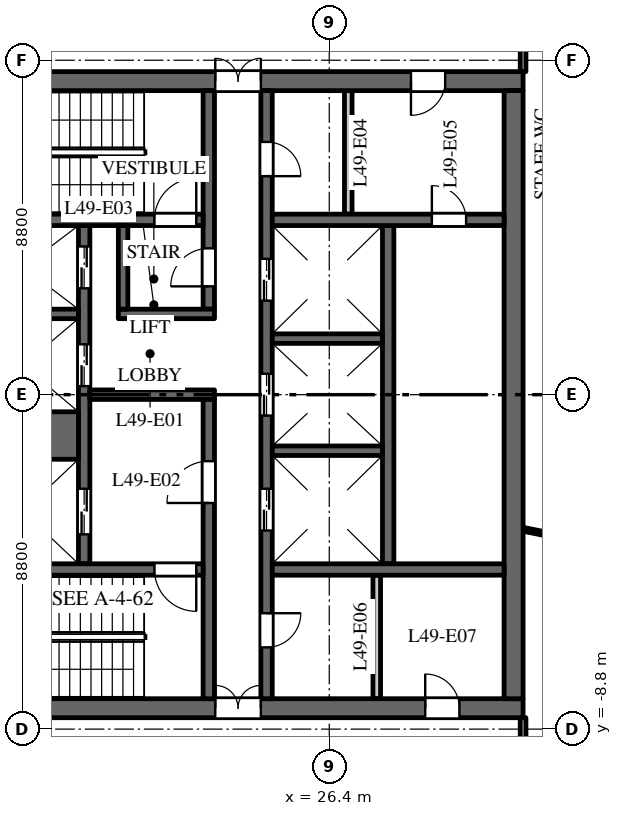
"""IFC4 building model, lengths in metres.
Left out: names, types, materials, properties, quantities, classifications, styles, units other than length and angle.
Written with IfcOpenShell. Run it as: python <this file> out.ifc"""

import sys

from ifc_helpers import new_model, si_unit, direction, frame, frame_2d, origin, place, context, subcontext, project, spatial, rectangle, extrude, element, fill, save


model = new_model("IFC4")
c1 = context("Model", 3, precision=1e-05, world=origin(), true_north=direction((0.0, 1.0)))
c2 = subcontext(c1, "Body", "Model", "MODEL_VIEW")
j1 = project(units=[si_unit("LENGTHUNIT", "METRE"), si_unit("PLANEANGLEUNIT", "RADIAN")], contexts=[c1])
p1 = place(None, origin())
s1 = spatial("IfcSite", under=j1, at=p1, CompositionType="ELEMENT")
p2 = place(p1, origin())
s2 = spatial("IfcBuilding", under=s1, at=p2, CompositionType="ELEMENT")
p3 = place(p2, frame((0.0, 0.0, 237.5)))
s3 = spatial("IfcBuildingStorey", under=s2, at=p3, CompositionType="ELEMENT", Elevation=237.5)
p4 = place(p3, frame((16.5, 8.25, 0.0), z_axis=(0.0, 0.0, 1.0), x_axis=(1.0, 0.0, 0.0)))
e1 = element("IfcWall", 1, at=p4, inside=s3, PredefinedType="SHEAR", context=c2, shape_type="SweptSolid", body=[
    extrude(rectangle(XDim=15.0, YDim=0.5, at=frame_2d((7.5, 0.0))), origin(), (0.0, 0.0, 1.0), 3.7),
])
p5 = place(p4, frame((6.9, 0.0, 0.0)))
e2 = element("IfcOpeningElement", 2, at=p5, cuts=e1, PredefinedType="OPENING", context=c2, shape_type="SweptSolid", body=[
    extrude(rectangle(XDim=1.2, YDim=2.1, at=frame_2d((0.6, 1.05))), frame((0.0, 0.26, 0.0), z_axis=(0.0, -1.0, 0.0), x_axis=(1.0, 0.0, 0.0)), (0.0, 0.0, 1.0), 0.52),
])
p6 = place(p4, frame((12.05, 0.0, 0.0)))
e3 = element("IfcOpeningElement", 3, at=p6, cuts=e1, PredefinedType="OPENING", context=c2, shape_type="SweptSolid", body=[
    extrude(rectangle(XDim=0.9, YDim=2.1, at=frame_2d((0.45, 1.05))), frame((0.0, 0.26, 0.0), z_axis=(0.0, -1.0, 0.0), x_axis=(1.0, 0.0, 0.0)), (0.0, 0.0, 1.0), 0.52),
])
p7 = place(p3, frame((16.5, -8.25, 0.0), z_axis=(0.0, 0.0, 1.0), x_axis=(1.0, 0.0, 0.0)))
e4 = element("IfcWall", 4, at=p7, inside=s3, PredefinedType="SHEAR", context=c2, shape_type="SweptSolid", body=[
    extrude(rectangle(XDim=15.0, YDim=0.5, at=frame_2d((7.5, 0.0))), origin(), (0.0, 0.0, 1.0), 3.7),
])
p8 = place(p7, frame((6.9, 0.0, 0.0)))
e5 = element("IfcOpeningElement", 5, at=p8, cuts=e4, PredefinedType="OPENING", context=c2, shape_type="SweptSolid", body=[
    extrude(rectangle(XDim=1.2, YDim=2.1, at=frame_2d((0.6, 1.05))), frame((0.0, 0.26, 0.0), z_axis=(0.0, -1.0, 0.0), x_axis=(1.0, 0.0, 0.0)), (0.0, 0.0, 1.0), 0.52),
])
p9 = place(p7, frame((12.425, 0.0, 0.0)))
e6 = element("IfcOpeningElement", 6, at=p9, cuts=e4, PredefinedType="OPENING", context=c2, shape_type="SweptSolid", body=[
    extrude(rectangle(XDim=0.9, YDim=2.1, at=frame_2d((0.45, 1.05))), frame((0.0, 0.26, 0.0), z_axis=(0.0, -1.0, 0.0), x_axis=(1.0, 0.0, 0.0)), (0.0, 0.0, 1.0), 0.52),
])
p10 = place(p3, frame((27.95, -4.45, 0.0), z_axis=(0.0, 0.0, 1.0), x_axis=(0.0, 1.0, 0.0)))
e7 = element("IfcWall", 7, at=p10, inside=s3, PredefinedType="SHEAR", context=c2, shape_type="SweptSolid", body=[
    extrude(rectangle(XDim=8.9, YDim=0.3, at=frame_2d((4.45, 0.0))), origin(), (0.0, 0.0, 1.0), 3.7),
])
p11 = place(p3, frame((19.95, -4.45, 0.0), z_axis=(0.0, 0.0, 1.0), x_axis=(0.0, 1.0, 0.0)))
e8 = element("IfcWall", 8, at=p11, inside=s3, PredefinedType="SHEAR", context=c2, shape_type="SweptSolid", body=[
    extrude(rectangle(XDim=8.9, YDim=0.3, at=frame_2d((4.45, 0.0))), origin(), (0.0, 0.0, 1.0), 3.7),
])
p12 = place(p11, frame((0.775, 0.0, 0.0)))
e9 = element("IfcOpeningElement", 9, at=p12, cuts=e8, PredefinedType="OPENING", context=c2, shape_type="SweptSolid", body=[
    extrude(rectangle(XDim=1.2, YDim=2.1, at=frame_2d((0.6, 1.05))), frame((0.0, 0.16, 0.0), z_axis=(0.0, -1.0, 0.0), x_axis=(1.0, 0.0, 0.0)), (0.0, 0.0, 1.0), 0.32),
])
p13 = place(p11, frame((4.675, 0.0, 0.0)))
e10 = element("IfcOpeningElement", 10, at=p13, cuts=e8, PredefinedType="OPENING", context=c2, shape_type="SweptSolid", body=[
    extrude(rectangle(XDim=1.1, YDim=2.1, at=frame_2d((0.55, 1.05))), frame((0.0, 0.16, 0.0), z_axis=(0.0, -1.0, 0.0), x_axis=(1.0, 0.0, 0.0)), (0.0, 0.0, 1.0), 0.32),
])
p14 = place(p11, frame((7.25, 0.0, 0.0)))
e11 = element("IfcOpeningElement", 11, at=p14, cuts=e8, PredefinedType="OPENING", context=c2, shape_type="SweptSolid", body=[
    extrude(rectangle(XDim=1.1, YDim=2.1, at=frame_2d((0.55, 1.05))), frame((0.0, 0.16, 0.0), z_axis=(0.0, -1.0, 0.0), x_axis=(1.0, 0.0, 0.0)), (0.0, 0.0, 1.0), 0.32),
])
p15 = place(p3, frame((24.75, -8.0, 0.0), z_axis=(0.0, 0.0, 1.0), x_axis=(0.0, 1.0, 0.0)))
e12 = element("IfcWall", 12, at=p15, inside=s3, PredefinedType="SHEAR", context=c2, shape_type="SweptSolid", body=[
    extrude(rectangle(XDim=16.0, YDim=0.3, at=frame_2d((8.0, 0.0))), origin(), (0.0, 0.0, 1.0), 3.7),
])
p16 = place(p15, frame((4.425, 0.0, 0.0)))
e13 = element("IfcOpeningElement", 13, at=p16, cuts=e12, PredefinedType="OPENING", context=c2, shape_type="SweptSolid", body=[
    extrude(rectangle(XDim=1.1, YDim=2.1, at=frame_2d((0.55, 1.05))), frame((0.0, 0.16, 0.0), z_axis=(0.0, -1.0, 0.0), x_axis=(1.0, 0.0, 0.0)), (0.0, 0.0, 1.0), 0.32),
])
p17 = place(p15, frame((7.45, 0.0, 0.0)))
e14 = element("IfcOpeningElement", 14, at=p17, cuts=e12, PredefinedType="OPENING", context=c2, shape_type="SweptSolid", body=[
    extrude(rectangle(XDim=1.1, YDim=2.1, at=frame_2d((0.55, 1.05))), frame((0.0, 0.16, 0.0), z_axis=(0.0, -1.0, 0.0), x_axis=(1.0, 0.0, 0.0)), (0.0, 0.0, 1.0), 0.32),
])
p18 = place(p15, frame((10.475, 0.0, 0.0)))
e15 = element("IfcOpeningElement", 15, at=p18, cuts=e12, PredefinedType="OPENING", context=c2, shape_type="SweptSolid", body=[
    extrude(rectangle(XDim=1.1, YDim=2.1, at=frame_2d((0.55, 1.05))), frame((0.0, 0.16, 0.0), z_axis=(0.0, -1.0, 0.0), x_axis=(1.0, 0.0, 0.0)), (0.0, 0.0, 1.0), 0.32),
])
p19 = place(p15, frame((13.75, 0.0, 0.0)))
e16 = element("IfcOpeningElement", 16, at=p19, cuts=e12, PredefinedType="OPENING", context=c2, shape_type="SweptSolid", body=[
    extrude(rectangle(XDim=0.9, YDim=2.1, at=frame_2d((0.45, 1.05))), frame((0.0, 0.16, 0.0), z_axis=(0.0, -1.0, 0.0), x_axis=(1.0, 0.0, 0.0)), (0.0, 0.0, 1.0), 0.32),
])
p20 = place(p15, frame((1.35, 0.0, 0.0)))
e17 = element("IfcOpeningElement", 17, at=p20, cuts=e12, PredefinedType="OPENING", context=c2, shape_type="SweptSolid", body=[
    extrude(rectangle(XDim=0.9, YDim=2.1, at=frame_2d((0.45, 1.05))), frame((0.0, 0.16, 0.0), z_axis=(0.0, -1.0, 0.0), x_axis=(1.0, 0.0, 0.0)), (0.0, 0.0, 1.0), 0.32),
])
p21 = place(p3, frame((20.1, 0.0, 0.0), z_axis=(0.0, 0.0, 1.0), x_axis=(1.0, 0.0, 0.0)))
e18 = element("IfcWall", 18, at=p21, inside=s3, PredefinedType="SHEAR", context=c2, shape_type="SweptSolid", body=[
    extrude(rectangle(XDim=3.28, YDim=0.25, at=frame_2d((1.64, 0.0))), origin(), (0.0, 0.0, 1.0), 3.7),
])
p22 = place(p3, frame((31.25, -8.0, 0.0), z_axis=(0.0, 0.0, 1.0), x_axis=(0.0, 1.0, 0.0)))
e19 = element("IfcWall", 19, at=p22, inside=s3, PredefinedType="SHEAR", context=c2, shape_type="SweptSolid", body=[
    extrude(rectangle(XDim=16.0, YDim=0.5, at=frame_2d((8.0, 0.0))), origin(), (0.0, 0.0, 1.0), 3.7),
])
p23 = place(p3, frame((24.9, 4.6, 0.0), z_axis=(0.0, 0.0, 1.0), x_axis=(1.0, 0.0, 0.0)))
e20 = element("IfcWall", 20, at=p23, inside=s3, PredefinedType="SHEAR", context=c2, shape_type="SweptSolid", body=[
    extrude(rectangle(XDim=6.1, YDim=0.3, at=frame_2d((3.05, 0.0))), origin(), (0.0, 0.0, 1.0), 3.7),
])
p24 = place(p23, frame((4.2, 0.0, 0.0)))
e21 = element("IfcOpeningElement", 21, at=p24, cuts=e20, PredefinedType="OPENING", context=c2, shape_type="SweptSolid", body=[
    extrude(rectangle(XDim=0.9, YDim=2.1, at=frame_2d((0.45, 1.05))), frame((0.0, 0.16, 0.0), z_axis=(0.0, -1.0, 0.0), x_axis=(1.0, 0.0, 0.0)), (0.0, 0.0, 1.0), 0.32),
])
for number, where, z_axis, x_axis in (
    (22, (26.9, 4.75, 0.0), (0.0, 0.0, 1.0), (0.0, 1.0, 0.0)),
    (23, (27.65, -8.0, 0.0), (0.0, 0.0, 1.0), (0.0, 1.0, 0.0)),
):
    element("IfcWall", number, at=place(p3, frame(where, z_axis=z_axis, x_axis=x_axis)), inside=s3, PredefinedType="PARTITIONING", context=c2, shape_type="SweptSolid", body=[
        extrude(rectangle(XDim=3.25, YDim=0.2, at=frame_2d((1.625, 0.0))), origin(), (0.0, 0.0, 1.0), 3.7),
    ])
p25 = place(p3, frame((24.9, -4.6, 0.0), z_axis=(0.0, 0.0, 1.0), x_axis=(1.0, 0.0, 0.0)))
e24 = element("IfcWall", 24, at=p25, inside=s3, PredefinedType="SHEAR", context=c2, shape_type="SweptSolid", body=[
    extrude(rectangle(XDim=6.1, YDim=0.3, at=frame_2d((3.05, 0.0))), origin(), (0.0, 0.0, 1.0), 3.7),
])
p26 = place(p3, frame((16.9, -1.075, 0.0), z_axis=(0.0, 0.0, 1.0), x_axis=(1.0, 0.0, 0.0)))
e25 = element("IfcWall", 25, at=p26, inside=s3, PredefinedType="SHEAR", context=c2, shape_type="SweptSolid", body=[
    extrude(rectangle(XDim=2.9, YDim=1.25, at=frame_2d((1.45, 0.0))), origin(), (0.0, 0.0, 1.0), 3.7),
])
for number, where, z_axis, x_axis in (
    (26, (16.9, 2.125, 0.0), (0.0, 0.0, 1.0), (1.0, 0.0, 0.0)),
    (27, (24.9, -1.475, 0.0), (0.0, 0.0, 1.0), (1.0, 0.0, 0.0)),
    (28, (24.9, 1.475, 0.0), (0.0, 0.0, 1.0), (1.0, 0.0, 0.0)),
):
    element("IfcWall", number, at=place(p3, frame(where, z_axis=z_axis, x_axis=x_axis)), inside=s3, PredefinedType="SHEAR", context=c2, shape_type="SweptSolid", body=[
        extrude(rectangle(XDim=2.9, YDim=0.25, at=frame_2d((1.45, 0.0))), origin(), (0.0, 0.0, 1.0), 3.7),
    ])
p27 = place(p3, frame((23.23, 2.25, 0.0), z_axis=(0.0, 0.0, 1.0), x_axis=(0.0, 1.0, 0.0)))
e29 = element("IfcWall", 29, at=p27, inside=s3, PredefinedType="SHEAR", context=c2, shape_type="SweptSolid", body=[
    extrude(rectangle(XDim=5.75, YDim=0.3, at=frame_2d((2.875, 0.0))), origin(), (0.0, 0.0, 1.0), 3.7),
])
p28 = place(p27, frame((0.6, 0.0, 0.0)))
e30 = element("IfcOpeningElement", 30, at=p28, cuts=e29, PredefinedType="OPENING", context=c2, shape_type="SweptSolid", body=[
    extrude(rectangle(XDim=1.0, YDim=2.1, at=frame_2d((0.5, 1.05))), frame((0.0, 0.16, 0.0), z_axis=(0.0, -1.0, 0.0), x_axis=(1.0, 0.0, 0.0)), (0.0, 0.0, 1.0), 0.32),
])
p29 = place(p3, frame((23.23, -8.0, 0.0), z_axis=(0.0, 0.0, 1.0), x_axis=(0.0, 1.0, 0.0)))
e31 = element("IfcWall", 31, at=p29, inside=s3, PredefinedType="SHEAR", context=c2, shape_type="SweptSolid", body=[
    extrude(rectangle(XDim=7.875, YDim=0.3, at=frame_2d((3.938, 0.0))), origin(), (0.0, 0.0, 1.0), 3.7),
])
p30 = place(p29, frame((5.15, 0.0, 0.0)))
e32 = element("IfcOpeningElement", 32, at=p30, cuts=e31, PredefinedType="OPENING", context=c2, shape_type="SweptSolid", body=[
    extrude(rectangle(XDim=1.1, YDim=2.1, at=frame_2d((0.55, 1.05))), frame((0.0, 0.16, 0.0), z_axis=(0.0, -1.0, 0.0), x_axis=(1.0, 0.0, 0.0)), (0.0, 0.0, 1.0), 0.32),
])
p31 = place(p3, frame((16.9, 4.6, 0.0), z_axis=(0.0, 0.0, 1.0), x_axis=(1.0, 0.0, 0.0)))
e33 = element("IfcWall", 33, at=p31, inside=s3, PredefinedType="SHEAR", context=c2, shape_type="SweptSolid", body=[
    extrude(rectangle(XDim=6.18, YDim=0.3, at=frame_2d((3.09, 0.0))), origin(), (0.0, 0.0, 1.0), 3.7),
])
p32 = place(p31, frame((4.9, 0.0, 0.0)))
e34 = element("IfcOpeningElement", 34, at=p32, cuts=e33, PredefinedType="OPENING", context=c2, shape_type="SweptSolid", body=[
    extrude(rectangle(XDim=1.1, YDim=2.1, at=frame_2d((0.55, 1.05))), frame((0.0, 0.16, 0.0), z_axis=(0.0, -1.0, 0.0), x_axis=(1.0, 0.0, 0.0)), (0.0, 0.0, 1.0), 0.32),
])
p33 = place(p3, frame((16.9, -4.6, 0.0), z_axis=(0.0, 0.0, 1.0), x_axis=(1.0, 0.0, 0.0)))
e35 = element("IfcWall", 35, at=p33, inside=s3, PredefinedType="SHEAR", context=c2, shape_type="SweptSolid", body=[
    extrude(rectangle(XDim=6.18, YDim=0.3, at=frame_2d((3.09, 0.0))), origin(), (0.0, 0.0, 1.0), 3.7),
])
p34 = place(p33, frame((4.9, 0.0, 0.0)))
e36 = element("IfcOpeningElement", 36, at=p34, cuts=e35, PredefinedType="OPENING", context=c2, shape_type="SweptSolid", body=[
    extrude(rectangle(XDim=1.1, YDim=2.1, at=frame_2d((0.55, 1.05))), frame((0.0, 0.16, 0.0), z_axis=(0.0, -1.0, 0.0), x_axis=(1.0, 0.0, 0.0)), (0.0, 0.0, 1.0), 0.32),
])
p35 = place(p3, frame((20.85, 2.125, 0.0), z_axis=(0.0, 0.0, 1.0), x_axis=(1.0, 0.0, 0.0)))
e37 = element("IfcWall", 37, at=p35, inside=s3, PredefinedType="SHEAR", context=c2, shape_type="SweptSolid", body=[
    extrude(rectangle(XDim=2.53, YDim=0.25, at=frame_2d((1.265, 0.0))), origin(), (0.0, 0.0, 1.0), 3.7),
])
p36 = place(p3, frame((20.975, 2.25, 0.0), z_axis=(0.0, 0.0, 1.0), x_axis=(0.0, 1.0, 0.0)))
e38 = element("IfcWall", 38, at=p36, inside=s3, PredefinedType="SHEAR", context=c2, shape_type="SweptSolid", body=[
    extrude(rectangle(XDim=2.2, YDim=0.25, at=frame_2d((1.1, 0.0))), origin(), (0.0, 0.0, 1.0), 3.7),
])
p37 = place(p3, frame((31.5, -10.7, 0.0), z_axis=(0.0, 0.0, 1.0), x_axis=(0.0, 1.0, 0.0)))
e39 = element("IfcWall", 39, at=p37, inside=s3, PredefinedType="PARTITIONING", context=c2, shape_type="SweptSolid", body=[
    extrude(rectangle(XDim=2.2, YDim=0.15, at=frame_2d((1.1, 0.0))), origin(), (0.0, 0.0, 1.0), 3.0),
])
p38 = place(p37, frame((0.65, 0.0, 0.0)))
e40 = element("IfcOpeningElement", 40, at=p38, cuts=e39, PredefinedType="OPENING", context=c2, shape_type="SweptSolid", body=[
    extrude(rectangle(XDim=1.0, YDim=2.1, at=frame_2d((0.5, 1.05))), frame((0.0, 0.085, 0.0), z_axis=(0.0, -1.0, 0.0), x_axis=(1.0, 0.0, 0.0)), (0.0, 0.0, 1.0), 0.17),
])
p39 = place(p3, frame((31.5, -3.542, 0.0), z_axis=(0.0, 0.0, 1.0), x_axis=(0.980357474535, -0.197228857227, 0.0)))
e41 = element("IfcWall", 41, at=p39, inside=s3, PredefinedType="PARTITIONING", context=c2, shape_type="SweptSolid", body=[
    extrude(rectangle(XDim=4.092, YDim=0.1, at=frame_2d((2.046, 0.0))), origin(), (0.0, 0.0, 1.0), 3.0),
])
p40 = place(p3, frame((31.5, 8.5, 0.0), z_axis=(0.0, 0.0, 1.0), x_axis=(0.0, 1.0, 0.0)))
e42 = element("IfcWall", 42, at=p40, inside=s3, PredefinedType="PARTITIONING", context=c2, shape_type="SweptSolid", body=[
    extrude(rectangle(XDim=2.2, YDim=0.15, at=frame_2d((1.1, 0.0))), origin(), (0.0, 0.0, 1.0), 3.0),
])
p41 = place(p40, frame((0.65, 0.0, 0.0)))
e43 = element("IfcOpeningElement", 43, at=p41, cuts=e42, PredefinedType="OPENING", context=c2, shape_type="SweptSolid", body=[
    extrude(rectangle(XDim=1.0, YDim=2.1, at=frame_2d((0.5, 1.05))), frame((0.0, 0.085, 0.0), z_axis=(0.0, -1.0, 0.0), x_axis=(1.0, 0.0, 0.0)), (0.0, 0.0, 1.0), 0.17),
])
p42 = place(p12, origin())
e44 = element("IfcDoor", 44, at=p42, inside=s3, OperationType="DOUBLE_DOOR_SLIDING", PredefinedType="DOOR", context=c2, shape_type="SweptSolid", body=[
    extrude(rectangle(XDim=1.2, YDim=2.1, at=frame_2d((0.6, 1.05))), frame((0.0, 0.025, 0.0), z_axis=(0.0, -1.0, 0.0), x_axis=(1.0, 0.0, 0.0)), (0.0, 0.0, 1.0), 0.05),
])
fill(e9, e44)
p43 = place(p13, origin())
e45 = element("IfcDoor", 45, at=p43, inside=s3, OperationType="DOUBLE_DOOR_SLIDING", PredefinedType="DOOR", context=c2, shape_type="SweptSolid", body=[
    extrude(rectangle(XDim=1.1, YDim=2.1, at=frame_2d((0.55, 1.05))), frame((0.0, 0.025, 0.0), z_axis=(0.0, -1.0, 0.0), x_axis=(1.0, 0.0, 0.0)), (0.0, 0.0, 1.0), 0.05),
])
fill(e10, e45)
p44 = place(p14, origin())
e46 = element("IfcDoor", 46, at=p44, inside=s3, OperationType="DOUBLE_DOOR_SLIDING", PredefinedType="DOOR", context=c2, shape_type="SweptSolid", body=[
    extrude(rectangle(XDim=1.1, YDim=2.1, at=frame_2d((0.55, 1.05))), frame((0.0, 0.025, 0.0), z_axis=(0.0, -1.0, 0.0), x_axis=(1.0, 0.0, 0.0)), (0.0, 0.0, 1.0), 0.05),
])
fill(e11, e46)
p45 = place(p16, origin())
e47 = element("IfcDoor", 47, at=p45, inside=s3, OperationType="DOUBLE_DOOR_SLIDING", PredefinedType="DOOR", context=c2, shape_type="SweptSolid", body=[
    extrude(rectangle(XDim=1.1, YDim=2.1, at=frame_2d((0.55, 1.05))), frame((0.0, 0.025, 0.0), z_axis=(0.0, -1.0, 0.0), x_axis=(1.0, 0.0, 0.0)), (0.0, 0.0, 1.0), 0.05),
])
fill(e13, e47)
p46 = place(p17, origin())
e48 = element("IfcDoor", 48, at=p46, inside=s3, OperationType="DOUBLE_DOOR_SLIDING", PredefinedType="DOOR", context=c2, shape_type="SweptSolid", body=[
    extrude(rectangle(XDim=1.1, YDim=2.1, at=frame_2d((0.55, 1.05))), frame((0.0, 0.025, 0.0), z_axis=(0.0, -1.0, 0.0), x_axis=(1.0, 0.0, 0.0)), (0.0, 0.0, 1.0), 0.05),
])
fill(e14, e48)
p47 = place(p18, origin())
e49 = element("IfcDoor", 49, at=p47, inside=s3, OperationType="DOUBLE_DOOR_SLIDING", PredefinedType="DOOR", context=c2, shape_type="SweptSolid", body=[
    extrude(rectangle(XDim=1.1, YDim=2.1, at=frame_2d((0.55, 1.05))), frame((0.0, 0.025, 0.0), z_axis=(0.0, -1.0, 0.0), x_axis=(1.0, 0.0, 0.0)), (0.0, 0.0, 1.0), 0.05),
])
fill(e15, e49)
p48 = place(p32, origin())
e50 = element("IfcDoor", 50, at=p48, inside=s3, OperationType="SINGLE_SWING_LEFT", PredefinedType="DOOR", context=c2, shape_type="SweptSolid", body=[
    extrude(rectangle(XDim=1.1, YDim=2.1, at=frame_2d((0.55, 1.05))), frame((0.0, 0.025, 0.0), z_axis=(0.0, -1.0, 0.0), x_axis=(1.0, 0.0, 0.0)), (0.0, 0.0, 1.0), 0.05),
])
fill(e34, e50)
p49 = place(p34, origin())
e51 = element("IfcDoor", 51, at=p49, inside=s3, OperationType="SINGLE_SWING_RIGHT", PredefinedType="DOOR", context=c2, shape_type="SweptSolid", body=[
    extrude(rectangle(XDim=1.1, YDim=2.1, at=frame_2d((0.55, 1.05))), frame((0.0, 0.025, 0.0), z_axis=(0.0, -1.0, 0.0), x_axis=(1.0, 0.0, 0.0)), (0.0, 0.0, 1.0), 0.05),
])
fill(e36, e51)
p50 = place(p30, origin())
e52 = element("IfcDoor", 52, at=p50, inside=s3, OperationType="SINGLE_SWING_RIGHT", PredefinedType="DOOR", context=c2, shape_type="SweptSolid", body=[
    extrude(rectangle(XDim=1.1, YDim=2.1, at=frame_2d((0.55, 1.05))), frame((0.0, 0.025, 0.0), z_axis=(0.0, -1.0, 0.0), x_axis=(1.0, 0.0, 0.0)), (0.0, 0.0, 1.0), 0.05),
])
fill(e32, e52)
p51 = place(p28, origin())
e53 = element("IfcDoor", 53, at=p51, inside=s3, OperationType="SINGLE_SWING_RIGHT", PredefinedType="DOOR", context=c2, shape_type="SweptSolid", body=[
    extrude(rectangle(XDim=1.0, YDim=2.1, at=frame_2d((0.5, 1.05))), frame((0.0, 0.025, 0.0), z_axis=(0.0, -1.0, 0.0), x_axis=(1.0, 0.0, 0.0)), (0.0, 0.0, 1.0), 0.05),
])
fill(e30, e53)
p52 = place(p5, origin())
e54 = element("IfcDoor", 54, at=p52, inside=s3, OperationType="DOUBLE_DOOR_DOUBLE_SWING", PredefinedType="DOOR", context=c2, shape_type="SweptSolid", body=[
    extrude(rectangle(XDim=1.2, YDim=2.1, at=frame_2d((0.6, 1.05))), frame((0.0, 0.025, 0.0), z_axis=(0.0, -1.0, 0.0), x_axis=(1.0, 0.0, 0.0)), (0.0, 0.0, 1.0), 0.05),
])
fill(e2, e54)
p53 = place(p8, origin())
e55 = element("IfcDoor", 55, at=p53, inside=s3, OperationType="DOUBLE_DOOR_DOUBLE_SWING", PredefinedType="DOOR", context=c2, shape_type="SweptSolid", body=[
    extrude(rectangle(XDim=1.2, YDim=2.1, at=frame_2d((0.6, 1.05))), frame((0.0, 0.025, 0.0), z_axis=(0.0, -1.0, 0.0), x_axis=(1.0, 0.0, 0.0)), (0.0, 0.0, 1.0), 0.05),
])
fill(e5, e55)
p54 = place(p19, origin())
e56 = element("IfcDoor", 56, at=p54, inside=s3, OperationType="SINGLE_SWING_LEFT", PredefinedType="DOOR", context=c2, shape_type="SweptSolid", body=[
    extrude(rectangle(XDim=0.9, YDim=2.1, at=frame_2d((0.45, 1.05))), frame((0.0, 0.025, 0.0), z_axis=(0.0, -1.0, 0.0), x_axis=(1.0, 0.0, 0.0)), (0.0, 0.0, 1.0), 0.05),
])
fill(e16, e56)
p55 = place(p6, origin())
e57 = element("IfcDoor", 57, at=p55, inside=s3, OperationType="SINGLE_SWING_LEFT", PredefinedType="DOOR", context=c2, shape_type="SweptSolid", body=[
    extrude(rectangle(XDim=0.9, YDim=2.1, at=frame_2d((0.45, 1.05))), frame((0.0, 0.025, 0.0), z_axis=(0.0, -1.0, 0.0), x_axis=(1.0, 0.0, 0.0)), (0.0, 0.0, 1.0), 0.05),
])
fill(e3, e57)
p56 = place(p20, origin())
e58 = element("IfcDoor", 58, at=p56, inside=s3, OperationType="SINGLE_SWING_RIGHT", PredefinedType="DOOR", context=c2, shape_type="SweptSolid", body=[
    extrude(rectangle(XDim=0.9, YDim=2.1, at=frame_2d((0.45, 1.05))), frame((0.0, 0.025, 0.0), z_axis=(0.0, -1.0, 0.0), x_axis=(1.0, 0.0, 0.0)), (0.0, 0.0, 1.0), 0.05),
])
fill(e17, e58)
p57 = place(p9, origin())
e59 = element("IfcDoor", 59, at=p57, inside=s3, OperationType="SINGLE_SWING_RIGHT", PredefinedType="DOOR", context=c2, shape_type="SweptSolid", body=[
    extrude(rectangle(XDim=0.9, YDim=2.1, at=frame_2d((0.45, 1.05))), frame((0.0, 0.025, 0.0), z_axis=(0.0, -1.0, 0.0), x_axis=(1.0, 0.0, 0.0)), (0.0, 0.0, 1.0), 0.05),
])
fill(e6, e59)
p58 = place(p24, origin())
e60 = element("IfcDoor", 60, at=p58, inside=s3, OperationType="SINGLE_SWING_RIGHT", PredefinedType="DOOR", context=c2, shape_type="SweptSolid", body=[
    extrude(rectangle(XDim=0.9, YDim=2.1, at=frame_2d((0.45, 1.05))), frame((0.0, 0.025, 0.0), z_axis=(0.0, -1.0, 0.0), x_axis=(1.0, 0.0, 0.0)), (0.0, 0.0, 1.0), 0.05),
])
fill(e21, e60)
save(model, sys.argv[1])
